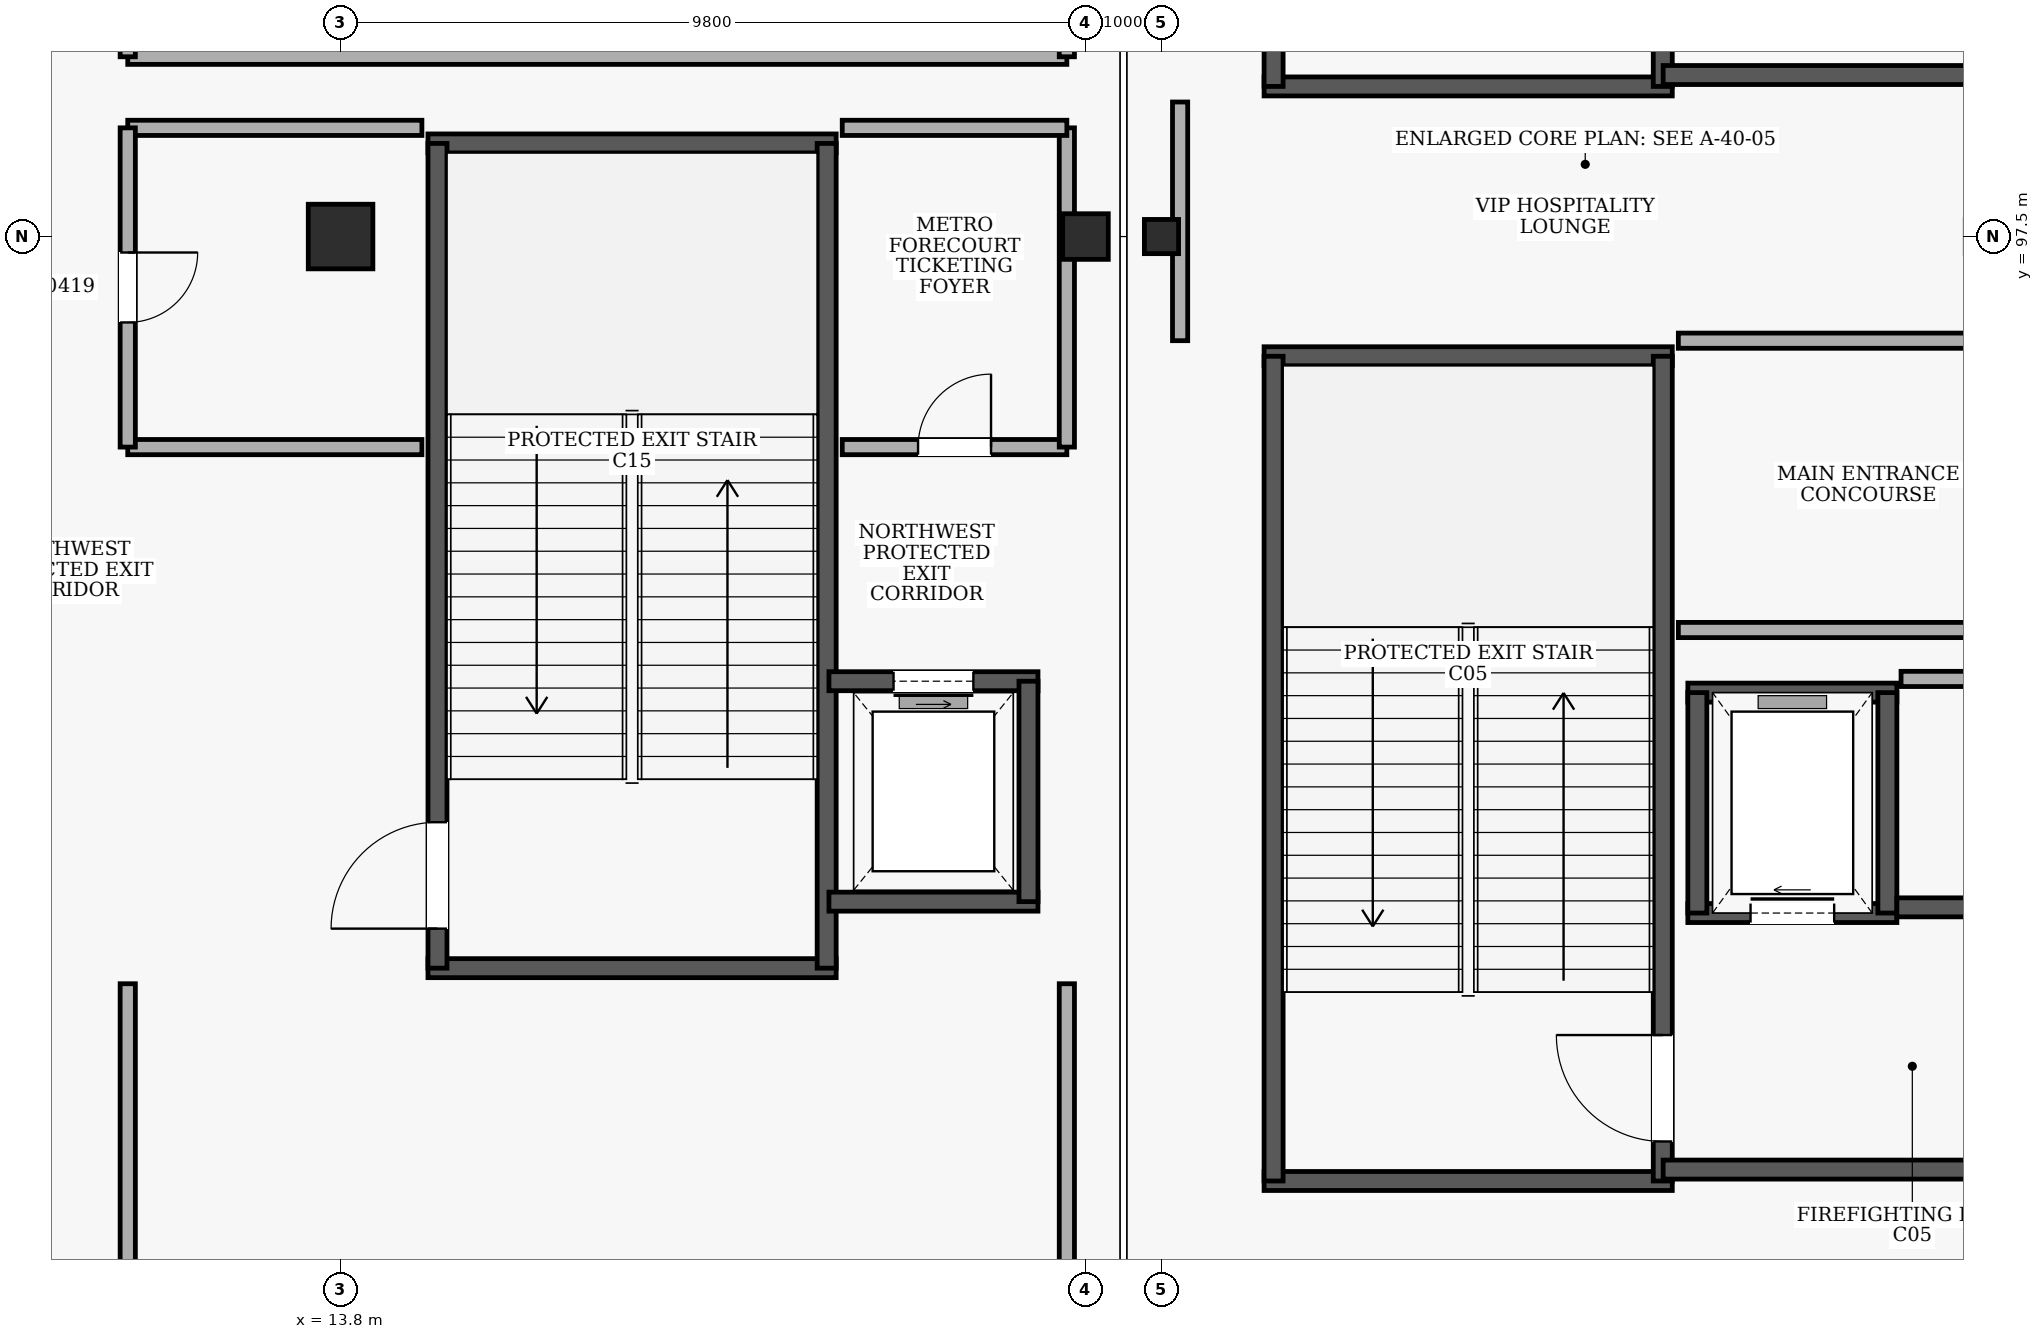
"""IFC4 building model, lengths in metres.
Left out: names, types, materials, properties, quantities, classifications, styles, units other than length and angle.
Written with IfcOpenShell. Run it as: python <this file> out.ifc"""

import sys

from ifc_helpers import new_model, si_unit, direction, frame, frame_2d, origin, origin_2d, place, context, subcontext, project, spatial, rectangle, extrude, element, fill, save


model = new_model("IFC4")
c1 = context("Model", 3, precision=1e-05, world=origin(), true_north=direction((0.0, 1.0)))
c2 = subcontext(c1, "Body", "Model", "MODEL_VIEW")
j1 = project(units=[si_unit("LENGTHUNIT", "METRE"), si_unit("PLANEANGLEUNIT", "RADIAN")], contexts=[c1])
p1 = place(None, origin())
s1 = spatial("IfcSite", under=j1, at=p1, CompositionType="ELEMENT")
p2 = place(p1, origin())
s2 = spatial("IfcBuilding", under=s1, at=p2, CompositionType="ELEMENT")
p3 = place(p2, origin())
s3 = spatial("IfcBuildingStorey", under=s2, at=p3, CompositionType="ELEMENT", Elevation=0.0)
p4 = place(p3, frame((13.8, 97.5, 0.0), z_axis=(0.0, 0.0, 1.0), x_axis=(1.0, 0.0, 0.0)))
e1 = element("IfcColumn", 1, at=p4, inside=s3, PredefinedType="COLUMN", context=c2, shape_type="SweptSolid", body=[
    extrude(rectangle(XDim=0.85, YDim=0.85, at=origin_2d()), origin(), (0.0, 0.0, 1.0), 5.4),
])
p5 = place(p3, frame((23.6, 97.5, 0.0), z_axis=(0.0, 0.0, 1.0), x_axis=(1.0, 0.0, 0.0)))
e2 = element("IfcColumn", 2, at=p5, inside=s3, PredefinedType="COLUMN", context=c2, shape_type="SweptSolid", body=[
    extrude(rectangle(XDim=0.6, YDim=0.6, at=origin_2d()), origin(), (0.0, 0.0, 1.0), 5.4),
])
p6 = place(p3, frame((24.6, 97.5, 0.0), z_axis=(0.0, 0.0, 1.0), x_axis=(1.0, 0.0, 0.0)))
e3 = element("IfcColumn", 3, at=p6, inside=s3, PredefinedType="COLUMN", context=c2, shape_type="SweptSolid", body=[
    extrude(rectangle(XDim=0.45, YDim=0.45, at=origin_2d()), origin(), (0.0, 0.0, 1.0), 5.4),
])
for number, where, z_axis, x_axis in (
    (4, (25.95, 85.075, 0.0), (0.0, 0.0, 1.0), (1.0, 0.0, 0.0)),
    (5, (31.32, 95.925, 0.0), (0.0, 0.0, 1.0), (-1.0, 0.0, 0.0)),
):
    element("IfcWall", number, at=place(p3, frame(where, z_axis=z_axis, x_axis=x_axis)), inside=s3, PredefinedType="SHEAR", context=c2, shape_type="SweptSolid", body=[
        extrude(rectangle(XDim=5.37, YDim=0.25, at=frame_2d((2.685, 0.0))), origin(), (0.0, 0.0, 1.0), 5.08),
    ])
p7 = place(p3, frame((26.075, 85.075, 0.0), z_axis=(0.0, 0.0, 1.0), x_axis=(0.0, 1.0, 0.0)))
e6 = element("IfcWall", 6, at=p7, inside=s3, PredefinedType="SHEAR", context=c2, shape_type="SweptSolid", body=[
    extrude(rectangle(XDim=10.85, YDim=0.25, at=frame_2d((5.425, 0.0))), origin(), (0.0, 0.0, 1.0), 5.08),
])
p8 = place(p3, frame((31.195, 85.075, 0.0), z_axis=(0.0, 0.0, 1.0), x_axis=(0.0, 1.0, 0.0)))
e7 = element("IfcWall", 7, at=p8, inside=s3, PredefinedType="SHEAR", context=c2, shape_type="SweptSolid", body=[
    extrude(rectangle(XDim=10.85, YDim=0.25, at=frame_2d((5.425, 0.0))), origin(), (0.0, 0.0, 1.0), 5.08),
])
p9 = place(p8, frame((0.52, 0.0, 0.0)))
e8 = element("IfcOpeningElement", 8, at=p9, cuts=e7, PredefinedType="OPENING", context=c2, shape_type="SweptSolid", body=[
    extrude(rectangle(XDim=1.4, YDim=2.15, at=frame_2d((0.7, 1.075))), frame((0.0, 0.135, 0.0), z_axis=(0.0, -1.0, 0.0), x_axis=(1.0, 0.0, 0.0)), (0.0, 0.0, 1.0), 0.27),
])
p10 = place(p3, frame((25.95, 99.475, 0.0), z_axis=(0.0, 0.0, 1.0), x_axis=(1.0, 0.0, 0.0)))
e9 = element("IfcWall", 9, at=p10, inside=s3, PredefinedType="SHEAR", context=c2, shape_type="SweptSolid", body=[
    extrude(rectangle(XDim=5.37, YDim=0.25, at=frame_2d((2.685, 0.0))), origin(), (0.0, 0.0, 1.0), 5.08),
])
p11 = place(p3, frame((26.075, 99.475, 0.0), z_axis=(0.0, 0.0, 1.0), x_axis=(0.0, 1.0, 0.0)))
e10 = element("IfcWall", 10, at=p11, inside=s3, PredefinedType="SHEAR", context=c2, shape_type="SweptSolid", body=[
    extrude(rectangle(XDim=10.85, YDim=0.25, at=frame_2d((5.425, 0.0))), origin(), (0.0, 0.0, 1.0), 5.08),
])
p12 = place(p3, frame((31.195, 99.475, 0.0), z_axis=(0.0, 0.0, 1.0), x_axis=(0.0, 1.0, 0.0)))
e11 = element("IfcWall", 11, at=p12, inside=s3, PredefinedType="SHEAR", context=c2, shape_type="SweptSolid", body=[
    extrude(rectangle(XDim=10.85, YDim=0.25, at=frame_2d((5.425, 0.0))), origin(), (0.0, 0.0, 1.0), 5.08),
])
p13 = place(p12, frame((0.52, 0.0, 0.0)))
e12 = element("IfcOpeningElement", 12, at=p13, cuts=e11, PredefinedType="OPENING", context=c2, shape_type="SweptSolid", body=[
    extrude(rectangle(XDim=1.4, YDim=2.15, at=frame_2d((0.7, 1.075))), frame((0.0, 0.135, 0.0), z_axis=(0.0, -1.0, 0.0), x_axis=(1.0, 0.0, 0.0)), (0.0, 0.0, 1.0), 0.27),
])
for number, where, z_axis, x_axis in (
    (13, (14.95, 87.875, 0.0), (0.0, 0.0, 1.0), (1.0, 0.0, 0.0)),
    (14, (20.32, 98.725, 0.0), (0.0, 0.0, 1.0), (-1.0, 0.0, 0.0)),
):
    element("IfcWall", number, at=place(p3, frame(where, z_axis=z_axis, x_axis=x_axis)), inside=s3, PredefinedType="SHEAR", context=c2, shape_type="SweptSolid", body=[
        extrude(rectangle(XDim=5.37, YDim=0.25, at=frame_2d((2.685, 0.0))), origin(), (0.0, 0.0, 1.0), 5.08),
    ])
p14 = place(p3, frame((15.075, 87.875, 0.0), z_axis=(0.0, 0.0, 1.0), x_axis=(0.0, 1.0, 0.0)))
e15 = element("IfcWall", 15, at=p14, inside=s3, PredefinedType="SHEAR", context=c2, shape_type="SweptSolid", body=[
    extrude(rectangle(XDim=10.85, YDim=0.25, at=frame_2d((5.425, 0.0))), origin(), (0.0, 0.0, 1.0), 5.08),
])
p15 = place(p14, frame((0.52, 0.0, 0.0)))
e16 = element("IfcOpeningElement", 16, at=p15, cuts=e15, PredefinedType="OPENING", context=c2, shape_type="SweptSolid", body=[
    extrude(rectangle(XDim=1.4, YDim=2.15, at=frame_2d((0.7, 1.075))), frame((0.0, 0.135, 0.0), z_axis=(0.0, -1.0, 0.0), x_axis=(1.0, 0.0, 0.0)), (0.0, 0.0, 1.0), 0.27),
])
p16 = place(p3, frame((20.195, 87.875, 0.0), z_axis=(0.0, 0.0, 1.0), x_axis=(0.0, 1.0, 0.0)))
e17 = element("IfcWall", 17, at=p16, inside=s3, PredefinedType="SHEAR", context=c2, shape_type="SweptSolid", body=[
    extrude(rectangle(XDim=10.85, YDim=0.25, at=frame_2d((5.425, 0.0))), origin(), (0.0, 0.0, 1.0), 5.08),
])
p17 = place(p3, frame((31.525, 88.6, 0.0), z_axis=(0.0, 0.0, 1.0), x_axis=(1.0, 0.0, 0.0)))
e18 = element("IfcWall", 18, at=p17, inside=s3, PredefinedType="SHEAR", context=c2, shape_type="SweptSolid", body=[
    extrude(rectangle(XDim=2.75, YDim=0.25, at=frame_2d((1.375, 0.0))), origin(), (0.0, 0.0, 1.0), 5.08),
])
p18 = place(p17, frame((0.825, 0.0, 0.0)))
e19 = element("IfcOpeningElement", 19, at=p18, cuts=e18, PredefinedType="OPENING", context=c2, shape_type="SweptSolid", body=[
    extrude(rectangle(XDim=1.1, YDim=2.15, at=frame_2d((0.55, 1.075))), frame((0.0, 0.135, 0.0), z_axis=(0.0, -1.0, 0.0), x_axis=(1.0, 0.0, 0.0)), (0.0, 0.0, 1.0), 0.27),
])
p19 = place(p3, frame((34.275, 91.5, 0.0), z_axis=(0.0, 0.0, 1.0), x_axis=(-1.0, 0.0, 0.0)))
e20 = element("IfcWall", 20, at=p19, inside=s3, PredefinedType="SHEAR", context=c2, shape_type="SweptSolid", body=[
    extrude(rectangle(XDim=2.75, YDim=0.25, at=frame_2d((1.375, 0.0))), origin(), (0.0, 0.0, 1.0), 5.08),
])
for number, where, z_axis, x_axis in (
    (21, (31.65, 91.5, 0.0), (0.0, 0.0, 1.0), (0.0, -1.0, 0.0)),
    (22, (34.15, 88.6, 0.0), (0.0, 0.0, 1.0), (0.0, 1.0, 0.0)),
):
    element("IfcWall", number, at=place(p3, frame(where, z_axis=z_axis, x_axis=x_axis)), inside=s3, PredefinedType="SHEAR", context=c2, shape_type="SweptSolid", body=[
        extrude(rectangle(XDim=2.9, YDim=0.25, at=frame_2d((1.45, 0.0))), origin(), (0.0, 0.0, 1.0), 5.08),
    ])
p20 = place(p3, frame((34.275, 88.675, 0.0), z_axis=(0.0, 0.0, 1.0), x_axis=(1.0, 0.0, 0.0)))
e23 = element("IfcWall", 23, at=p20, inside=s3, PredefinedType="SHEAR", context=c2, shape_type="SweptSolid", body=[
    extrude(rectangle(XDim=2.525, YDim=0.25, at=frame_2d((1.263, 0.0))), origin(), (0.0, 0.0, 1.0), 5.08),
])
for number, where, z_axis, x_axis in (
    (24, (31.2, 85.225, 0.0), (0.0, 0.0, 1.0), (1.0, 0.0, 0.0)),
    (25, (31.2, 99.625, 0.0), (0.0, 0.0, 1.0), (1.0, 0.0, 0.0)),
):
    element("IfcWall", number, at=place(p3, frame(where, z_axis=z_axis, x_axis=x_axis)), inside=s3, PredefinedType="SHEAR", context=c2, shape_type="SweptSolid", body=[
        extrude(rectangle(XDim=5.6, YDim=0.25, at=frame_2d((2.8, 0.0))), origin(), (0.0, 0.0, 1.0), 5.08),
    ])
p21 = place(p3, frame((20.225, 88.75, 0.0), z_axis=(0.0, 0.0, 1.0), x_axis=(1.0, 0.0, 0.0)))
e26 = element("IfcWall", 26, at=p21, inside=s3, PredefinedType="SHEAR", context=c2, shape_type="SweptSolid", body=[
    extrude(rectangle(XDim=2.75, YDim=0.25, at=frame_2d((1.375, 0.0))), origin(), (0.0, 0.0, 1.0), 5.08),
])
p22 = place(p3, frame((22.975, 91.65, 0.0), z_axis=(0.0, 0.0, 1.0), x_axis=(-1.0, 0.0, 0.0)))
e27 = element("IfcWall", 27, at=p22, inside=s3, PredefinedType="SHEAR", context=c2, shape_type="SweptSolid", body=[
    extrude(rectangle(XDim=2.75, YDim=0.25, at=frame_2d((1.375, 0.0))), origin(), (0.0, 0.0, 1.0), 5.08),
])
p23 = place(p22, frame((0.85, 0.0, 0.0)))
e28 = element("IfcOpeningElement", 28, at=p23, cuts=e27, PredefinedType="OPENING", context=c2, shape_type="SweptSolid", body=[
    extrude(rectangle(XDim=1.05, YDim=2.15, at=frame_2d((0.525, 1.075))), frame((0.0, 0.135, 0.0), z_axis=(0.0, -1.0, 0.0), x_axis=(1.0, 0.0, 0.0)), (0.0, 0.0, 1.0), 0.27),
])
p24 = place(p3, frame((22.85, 88.75, 0.0), z_axis=(0.0, 0.0, 1.0), x_axis=(0.0, 1.0, 0.0)))
e29 = element("IfcWall", 29, at=p24, inside=s3, PredefinedType="SHEAR", context=c2, shape_type="SweptSolid", body=[
    extrude(rectangle(XDim=2.9, YDim=0.25, at=frame_2d((1.45, 0.0))), origin(), (0.0, 0.0, 1.0), 5.08),
])
p25 = place(p3, frame((37.2, 91.68, 0.0), z_axis=(0.0, 0.0, 1.0), x_axis=(-1.0, 0.0, 0.0)))
e30 = element("IfcWall", 30, at=p25, inside=s3, PredefinedType="PARTITIONING", context=c2, shape_type="SweptSolid", body=[
    extrude(rectangle(XDim=2.87, YDim=0.2, at=frame_2d((1.435, 0.0))), origin(), (0.0, 0.0, 1.0), 5.08),
])
p26 = place(p3, frame((24.845, 99.27, 0.0), z_axis=(0.0, 0.0, 1.0), x_axis=(0.0, -1.0, 0.0)))
e31 = element("IfcWall", 31, at=p26, inside=s3, PredefinedType="PARTITIONING", context=c2, shape_type="SweptSolid", body=[
    extrude(rectangle(XDim=3.14, YDim=0.2, at=frame_2d((1.57, 0.0))), origin(), (0.0, 0.0, 1.0), 4.16),
])
for number, where, z_axis, x_axis in (
    (32, (31.4, 92.323, 0.0), (0.0, 0.0, 1.0), (1.0, 0.0, 0.0)),
    (33, (37.2, 96.13, 0.0), (0.0, 0.0, 1.0), (-1.0, 0.0, 0.0)),
):
    element("IfcWall", number, at=place(p3, frame(where, z_axis=z_axis, x_axis=x_axis)), inside=s3, PredefinedType="PARTITIONING", context=c2, shape_type="SweptSolid", body=[
        extrude(rectangle(XDim=5.8, YDim=0.2, at=frame_2d((2.9, 0.0))), origin(), (0.0, 0.0, 1.0), 5.08),
    ])
p27 = place(p3, frame((23.355, 76.895, 0.0), z_axis=(0.0, 0.0, 1.0), x_axis=(0.0, 1.0, 0.0)))
e34 = element("IfcWall", 34, at=p27, inside=s3, PredefinedType="PARTITIONING", context=c2, shape_type="SweptSolid", body=[
    extrude(rectangle(XDim=10.775, YDim=0.2, at=frame_2d((5.387, 0.0))), origin(), (0.0, 0.0, 1.0), 4.41),
])
p28 = place(p3, frame((11.0, 87.67, 0.0), z_axis=(0.0, 0.0, 1.0), x_axis=(0.0, -1.0, 0.0)))
e35 = element("IfcWall", 35, at=p28, inside=s3, PredefinedType="PARTITIONING", context=c2, shape_type="SweptSolid", body=[
    extrude(rectangle(XDim=10.775, YDim=0.2, at=frame_2d((5.387, 0.0))), origin(), (0.0, 0.0, 1.0), 5.08),
])
p29 = place(p28, frame((4.825, 0.0, 0.0)))
e36 = element("IfcOpeningElement", 36, at=p29, cuts=e35, PredefinedType="OPENING", context=c2, shape_type="SweptSolid", body=[
    extrude(rectangle(XDim=2.36, YDim=2.4, at=frame_2d((1.18, 1.2))), frame((0.0, 0.11, 0.0), z_axis=(0.0, -1.0, 0.0), x_axis=(1.0, 0.0, 0.0)), (0.0, 0.0, 1.0), 0.22),
])
for number, where, z_axis, x_axis in (
    (37, (11.0, 94.73, 0.0), (0.0, 0.0, 1.0), (1.0, 0.0, 0.0)),
    (38, (14.87, 98.93, 0.0), (0.0, 0.0, 1.0), (-1.0, 0.0, 0.0)),
):
    element("IfcWall", number, at=place(p3, frame(where, z_axis=z_axis, x_axis=x_axis)), inside=s3, PredefinedType="PARTITIONING", context=c2, shape_type="SweptSolid", body=[
        extrude(rectangle(XDim=3.87, YDim=0.2, at=frame_2d((1.935, 0.0))), origin(), (0.0, 0.0, 1.0), 5.08),
    ])
p30 = place(p3, frame((11.0, 98.93, 0.0), z_axis=(0.0, 0.0, 1.0), x_axis=(0.0, -1.0, 0.0)))
e39 = element("IfcWall", 39, at=p30, inside=s3, PredefinedType="PARTITIONING", context=c2, shape_type="SweptSolid", body=[
    extrude(rectangle(XDim=4.2, YDim=0.2, at=frame_2d((2.1, 0.0))), origin(), (0.0, 0.0, 1.0), 5.08),
])
p31 = place(p30, frame((1.64, 0.0, 0.0)))
e40 = element("IfcOpeningElement", 40, at=p31, cuts=e39, PredefinedType="OPENING", context=c2, shape_type="SweptSolid", body=[
    extrude(rectangle(XDim=0.92, YDim=2.1, at=frame_2d((0.46, 1.05))), frame((0.0, 0.11, 0.0), z_axis=(0.0, -1.0, 0.0), x_axis=(1.0, 0.0, 0.0)), (0.0, 0.0, 1.0), 0.22),
])
p32 = place(p3, frame((20.4, 94.73, 0.0), z_axis=(0.0, 0.0, 1.0), x_axis=(1.0, 0.0, 0.0)))
e41 = element("IfcWall", 41, at=p32, inside=s3, PredefinedType="PARTITIONING", context=c2, shape_type="SweptSolid", body=[
    extrude(rectangle(XDim=2.955, YDim=0.2, at=frame_2d((1.478, 0.0))), origin(), (0.0, 0.0, 1.0), 5.08),
])
p33 = place(p32, frame((0.998, 0.0, 0.0)))
e42 = element("IfcOpeningElement", 42, at=p33, cuts=e41, PredefinedType="OPENING", context=c2, shape_type="SweptSolid", body=[
    extrude(rectangle(XDim=0.96, YDim=2.1, at=frame_2d((0.48, 1.05))), frame((0.0, 0.11, 0.0), z_axis=(0.0, -1.0, 0.0), x_axis=(1.0, 0.0, 0.0)), (0.0, 0.0, 1.0), 0.22),
])
p34 = place(p3, frame((23.355, 94.73, 0.0), z_axis=(0.0, 0.0, 1.0), x_axis=(0.0, 1.0, 0.0)))
e43 = element("IfcWall", 43, at=p34, inside=s3, PredefinedType="PARTITIONING", context=c2, shape_type="SweptSolid", body=[
    extrude(rectangle(XDim=4.2, YDim=0.2, at=frame_2d((2.1, 0.0))), origin(), (0.0, 0.0, 1.0), 4.31),
])
p35 = place(p3, frame((23.355, 98.93, 0.0), z_axis=(0.0, 0.0, 1.0), x_axis=(-1.0, 0.0, 0.0)))
e44 = element("IfcWall", 44, at=p35, inside=s3, PredefinedType="PARTITIONING", context=c2, shape_type="SweptSolid", body=[
    extrude(rectangle(XDim=2.955, YDim=0.2, at=frame_2d((1.478, 0.0))), origin(), (0.0, 0.0, 1.0), 5.08),
])
p36 = place(p3, frame((11.0, 99.865, 0.0), z_axis=(0.0, 0.0, 1.0), x_axis=(1.0, 0.0, 0.0)))
e45 = element("IfcWall", 45, at=p36, inside=s3, PredefinedType="PARTITIONING", context=c2, shape_type="SweptSolid", body=[
    extrude(rectangle(XDim=12.355, YDim=0.2, at=frame_2d((6.177, 0.0))), origin(), (0.0, 0.0, 1.0), 5.08),
])
p37 = place(p3, frame((23.355, 99.865, 0.0), z_axis=(0.0, 0.0, 1.0), x_axis=(0.0, 1.0, 0.0)))
e46 = element("IfcWall", 46, at=p37, inside=s3, PredefinedType="PARTITIONING", context=c2, shape_type="SweptSolid", body=[
    extrude(rectangle(XDim=11.185, YDim=0.2, at=frame_2d((5.593, 0.0))), origin(), (0.0, 0.0, 1.0), 4.31),
])
p38 = place(p3, frame((11.0, 111.05, 0.0), z_axis=(0.0, 0.0, 1.0), x_axis=(0.0, -1.0, 0.0)))
e47 = element("IfcWall", 47, at=p38, inside=s3, PredefinedType="PARTITIONING", context=c2, shape_type="SweptSolid", body=[
    extrude(rectangle(XDim=11.185, YDim=0.2, at=frame_2d((5.593, 0.0))), origin(), (0.0, 0.0, 1.0), 5.08),
])
p39 = place(p38, frame((5.093, 0.0, 0.0)))
e48 = element("IfcOpeningElement", 48, at=p39, cuts=e47, PredefinedType="OPENING", context=c2, shape_type="SweptSolid", body=[
    extrude(rectangle(XDim=1.0, YDim=2.1, at=frame_2d((0.5, 1.05))), frame((0.0, 0.11, 0.0), z_axis=(0.0, -1.0, 0.0), x_axis=(1.0, 0.0, 0.0)), (0.0, 0.0, 1.0), 0.22),
])
p40 = place(p9, frame((1.4, 0.0, 0.0), z_axis=(0.0, 0.0, 1.0), x_axis=(-1.0, 0.0, 0.0)))
e49 = element("IfcDoor", 49, at=p40, inside=s3, OperationType="SINGLE_SWING_LEFT", PredefinedType="DOOR", context=c2, shape_type="SweptSolid", body=[
    extrude(rectangle(XDim=1.4, YDim=2.15, at=frame_2d((0.7, 1.075))), frame((0.0, 0.025, 0.0), z_axis=(0.0, -1.0, 0.0), x_axis=(1.0, 0.0, 0.0)), (0.0, 0.0, 1.0), 0.05),
])
fill(e8, e49)
p41 = place(p15, origin())
e50 = element("IfcDoor", 50, at=p41, inside=s3, OperationType="SINGLE_SWING_LEFT", PredefinedType="DOOR", context=c2, shape_type="SweptSolid", body=[
    extrude(rectangle(XDim=1.4, YDim=2.15, at=frame_2d((0.7, 1.075))), frame((0.0, 0.025, 0.0), z_axis=(0.0, -1.0, 0.0), x_axis=(1.0, 0.0, 0.0)), (0.0, 0.0, 1.0), 0.05),
])
fill(e16, e50)
p42 = place(p18, origin())
e51 = element("IfcDoor", 51, at=p42, inside=s3, OperationType="SLIDING_TO_RIGHT", PredefinedType="DOOR", context=c2, shape_type="SweptSolid", body=[
    extrude(rectangle(XDim=1.1, YDim=2.15, at=frame_2d((0.55, 1.075))), frame((0.0, 0.025, 0.0), z_axis=(0.0, -1.0, 0.0), x_axis=(1.0, 0.0, 0.0)), (0.0, 0.0, 1.0), 0.05),
])
fill(e19, e51)
p43 = place(p23, origin())
e52 = element("IfcDoor", 52, at=p43, inside=s3, OperationType="SLIDING_TO_RIGHT", PredefinedType="DOOR", context=c2, shape_type="SweptSolid", body=[
    extrude(rectangle(XDim=1.05, YDim=2.15, at=frame_2d((0.525, 1.075))), frame((0.0, 0.025, 0.0), z_axis=(0.0, -1.0, 0.0), x_axis=(1.0, 0.0, 0.0)), (0.0, 0.0, 1.0), 0.05),
])
fill(e28, e52)
p44 = place(p31, origin())
e53 = element("IfcDoor", 53, at=p44, inside=s3, OperationType="SINGLE_SWING_LEFT", PredefinedType="DOOR", context=c2, shape_type="SweptSolid", body=[
    extrude(rectangle(XDim=0.92, YDim=2.1, at=frame_2d((0.46, 1.05))), frame((0.0, 0.025, 0.0), z_axis=(0.0, -1.0, 0.0), x_axis=(1.0, 0.0, 0.0)), (0.0, 0.0, 1.0), 0.05),
])
fill(e40, e53)
p45 = place(p33, origin())
e54 = element("IfcDoor", 54, at=p45, inside=s3, OperationType="SINGLE_SWING_RIGHT", PredefinedType="DOOR", context=c2, shape_type="SweptSolid", body=[
    extrude(rectangle(XDim=0.96, YDim=2.1, at=frame_2d((0.48, 1.05))), frame((0.0, 0.025, 0.0), z_axis=(0.0, -1.0, 0.0), x_axis=(1.0, 0.0, 0.0)), (0.0, 0.0, 1.0), 0.05),
])
fill(e42, e54)
save(model, sys.argv[1])
